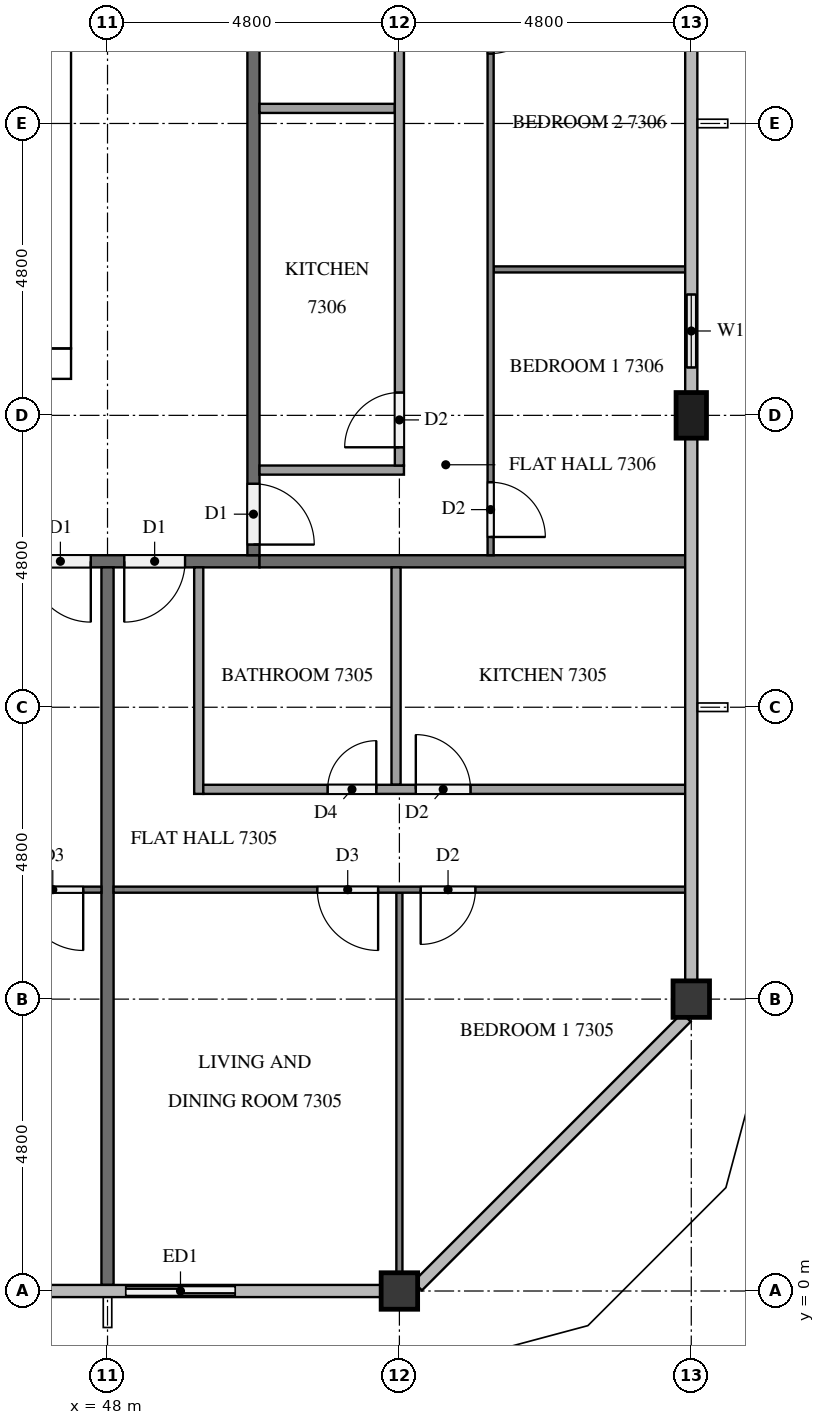
"""IFC4 building model, lengths in metres.
Left out: names, types, materials, properties, quantities, classifications, styles, units other than length and angle.
Written with IfcOpenShell. Run it as: python <this file> out.ifc"""

import sys

from ifc_helpers import new_model, si_unit, direction, frame, frame_2d, origin, origin_2d, place, context, subcontext, project, spatial, rectangle, extrude, element, fill, save


model = new_model("IFC4")
c1 = context("Model", 3, precision=1e-05, world=origin(), true_north=direction((0.0, 1.0)))
c2 = subcontext(c1, "Body", "Model", "MODEL_VIEW")
j1 = project(units=[si_unit("LENGTHUNIT", "METRE"), si_unit("PLANEANGLEUNIT", "RADIAN")], contexts=[c1])
p1 = place(None, origin())
s1 = spatial("IfcSite", under=j1, at=p1, CompositionType="ELEMENT")
p2 = place(p1, origin())
s2 = spatial("IfcBuilding", under=s1, at=p2, CompositionType="ELEMENT")
p3 = place(p2, frame((0.0, 0.0, 279.1)))
s3 = spatial("IfcBuildingStorey", under=s2, at=p3, CompositionType="ELEMENT", Elevation=279.1)
p4 = place(p3, frame((15.0, 15.25, 0.0), z_axis=(0.0, 0.0, 1.0), x_axis=(1.0, 0.0, 0.0)))
e1 = element("IfcWall", 1, at=p4, inside=s3, PredefinedType="SHEAR", context=c2, shape_type="SweptSolid", body=[
    extrude(rectangle(XDim=32.4, YDim=0.5, at=frame_2d((16.2, 0.0))), origin(), (0.0, 0.0, 1.0), 3.2),
])
p5 = place(p4, frame((15.3, 0.0, 0.0)))
e2 = element("IfcOpeningElement", 2, at=p5, cuts=e1, PredefinedType="OPENING", context=c2, shape_type="SweptSolid", body=[
    extrude(rectangle(XDim=1.8, YDim=2.1, at=frame_2d((0.9, 1.05))), frame((0.0, 0.26, 0.0), z_axis=(0.0, -1.0, 0.0), x_axis=(1.0, 0.0, 0.0)), (0.0, 0.0, 1.0), 0.52),
])
p6 = place(p3, frame((47.15, 15.5, 0.0), z_axis=(0.0, 0.0, 1.0), x_axis=(0.0, 1.0, 0.0)))
e3 = element("IfcWall", 3, at=p6, inside=s3, PredefinedType="SHEAR", context=c2, shape_type="SweptSolid", body=[
    extrude(rectangle(XDim=21.8, YDim=0.5, at=frame_2d((10.9, 0.0))), origin(), (0.0, 0.0, 1.0), 3.2),
])
p7 = place(p6, frame((10.6, 0.0, 0.0)))
e4 = element("IfcOpeningElement", 4, at=p7, cuts=e3, PredefinedType="OPENING", context=c2, shape_type="SweptSolid", body=[
    extrude(rectangle(XDim=1.2, YDim=2.1, at=frame_2d((0.6, 1.05))), frame((0.0, 0.26, 0.0), z_axis=(0.0, -1.0, 0.0), x_axis=(1.0, 0.0, 0.0)), (0.0, 0.0, 1.0), 0.52),
])
for number, where, z_axis, x_axis in (
    (5, (52.8, 0.0, 0.0), (0.0, 0.0, 1.0), (1.0, 0.0, 0.0)),
    (6, (57.6, 4.8, 0.0), (0.0, 0.0, 1.0), (1.0, 0.0, 0.0)),
):
    element("IfcColumn", number, at=place(p3, frame(where, z_axis=z_axis, x_axis=x_axis)), inside=s3, PredefinedType="COLUMN", context=c2, shape_type="SweptSolid", body=[
        extrude(rectangle(XDim=0.6, YDim=0.6, at=origin_2d()), origin(), (0.0, 0.0, 1.0), 3.2),
    ])
p8 = place(p3, frame((57.6, 14.4, 0.0), z_axis=(0.0, 0.0, 1.0), x_axis=(0.0, 1.0, 0.0)))
e7 = element("IfcColumn", 7, at=p8, inside=s3, PredefinedType="COLUMN", context=c2, shape_type="SweptSolid", body=[
    extrude(rectangle(XDim=0.75, YDim=0.5, at=origin_2d()), origin(), (0.0, 0.0, 1.0), 3.2),
])
p9 = place(p3, frame((48.0, 0.0, 0.0), z_axis=(0.0, 0.0, 1.0), x_axis=(1.0, 0.0, 0.0)))
e8 = element("IfcWall", 8, at=p9, inside=s3, PredefinedType="SOLIDWALL", context=c2, shape_type="SweptSolid", body=[
    extrude(rectangle(XDim=2.4, YDim=0.15, at=frame_2d((1.2, 0.0))), origin(), (0.0, 0.0, 1.0), 3.2),
])
p10 = place(p9, frame((0.3, 0.0, 0.0)))
e9 = element("IfcOpeningElement", 9, at=p10, cuts=e8, PredefinedType="OPENING", context=c2, shape_type="SweptSolid", body=[
    extrude(rectangle(XDim=1.8, YDim=2.4, at=frame_2d((0.9, 1.2))), frame((0.0, 0.085, 0.0), z_axis=(0.0, -1.0, 0.0), x_axis=(1.0, 0.0, 0.0)), (0.0, 0.0, 1.0), 0.17),
])
p11 = place(p3, frame((57.6, 14.775, 0.0), z_axis=(0.0, 0.0, 1.0), x_axis=(0.0, 1.0, 0.0)))
e10 = element("IfcWall", 10, at=p11, inside=s3, PredefinedType="SOLIDWALL", context=c2, shape_type="SweptSolid", body=[
    extrude(rectangle(XDim=2.025, YDim=0.15, at=frame_2d((1.013, 0.0))), origin(), (0.0, 0.0, 1.0), 3.2),
])
p12 = place(p11, frame((0.413, 0.0, 0.9)))
e11 = element("IfcOpeningElement", 11, at=p12, cuts=e10, PredefinedType="OPENING", context=c2, shape_type="SweptSolid", body=[
    extrude(rectangle(XDim=1.2, YDim=1.4, at=frame_2d((0.6, 0.7))), frame((0.0, 0.085, 0.0), z_axis=(0.0, -1.0, 0.0), x_axis=(1.0, 0.0, 0.0)), (0.0, 0.0, 1.0), 0.17),
])
p13 = place(p3, frame((50.5, 12.0, 0.0), z_axis=(0.0, 0.0, 1.0), x_axis=(-1.0, 0.0, 0.0)))
e12 = element("IfcWall", 12, at=p13, inside=s3, PredefinedType="PARTITIONING", context=c2, shape_type="SweptSolid", body=[
    extrude(rectangle(XDim=38.6, YDim=0.2, at=frame_2d((19.3, 0.0))), origin(), (0.0, 0.0, 1.0), 3.2),
])
p14 = place(p13, frame((36.375, 0.0, 0.0)))
e13 = element("IfcOpeningElement", 13, at=p14, cuts=e12, PredefinedType="OPENING", context=c2, shape_type="SweptSolid", body=[
    extrude(rectangle(XDim=1.0, YDim=2.1, at=frame_2d((0.5, 1.05))), frame((0.0, 0.11, 0.0), z_axis=(0.0, -1.0, 0.0), x_axis=(1.0, 0.0, 0.0)), (0.0, 0.0, 1.0), 0.22),
])
p15 = place(p13, frame((29.175, 0.0, 0.0)))
e14 = element("IfcOpeningElement", 14, at=p15, cuts=e12, PredefinedType="OPENING", context=c2, shape_type="SweptSolid", body=[
    extrude(rectangle(XDim=1.0, YDim=2.1, at=frame_2d((0.5, 1.05))), frame((0.0, 0.11, 0.0), z_axis=(0.0, -1.0, 0.0), x_axis=(1.0, 0.0, 0.0)), (0.0, 0.0, 1.0), 0.22),
])
p16 = place(p13, frame((27.625, 0.0, 0.0)))
e15 = element("IfcOpeningElement", 15, at=p16, cuts=e12, PredefinedType="OPENING", context=c2, shape_type="SweptSolid", body=[
    extrude(rectangle(XDim=1.0, YDim=2.1, at=frame_2d((0.5, 1.05))), frame((0.0, 0.11, 0.0), z_axis=(0.0, -1.0, 0.0), x_axis=(1.0, 0.0, 0.0)), (0.0, 0.0, 1.0), 0.22),
])
p17 = place(p13, frame((2.775, 0.0, 0.0)))
e16 = element("IfcOpeningElement", 16, at=p17, cuts=e12, PredefinedType="OPENING", context=c2, shape_type="SweptSolid", body=[
    extrude(rectangle(XDim=1.0, YDim=2.1, at=frame_2d((0.5, 1.05))), frame((0.0, 0.11, 0.0), z_axis=(0.0, -1.0, 0.0), x_axis=(1.0, 0.0, 0.0)), (0.0, 0.0, 1.0), 0.22),
])
p18 = place(p13, frame((1.225, 0.0, 0.0)))
e17 = element("IfcOpeningElement", 17, at=p18, cuts=e12, PredefinedType="OPENING", context=c2, shape_type="SweptSolid", body=[
    extrude(rectangle(XDim=1.0, YDim=2.1, at=frame_2d((0.5, 1.05))), frame((0.0, 0.11, 0.0), z_axis=(0.0, -1.0, 0.0), x_axis=(1.0, 0.0, 0.0)), (0.0, 0.0, 1.0), 0.22),
])
p19 = place(p3, frame((50.4, 40.7, 0.0), z_axis=(0.0, 0.0, 1.0), x_axis=(0.0, -1.0, 0.0)))
e18 = element("IfcWall", 18, at=p19, inside=s3, PredefinedType="PARTITIONING", context=c2, shape_type="SweptSolid", body=[
    extrude(rectangle(XDim=28.6, YDim=0.2, at=frame_2d((14.3, 0.0))), origin(), (0.0, 0.0, 1.0), 3.2),
])
p20 = place(p19, frame((27.425, 0.0, 0.0)))
e19 = element("IfcOpeningElement", 19, at=p20, cuts=e18, PredefinedType="OPENING", context=c2, shape_type="SweptSolid", body=[
    extrude(rectangle(XDim=1.0, YDim=2.1, at=frame_2d((0.5, 1.05))), frame((0.0, 0.11, 0.0), z_axis=(0.0, -1.0, 0.0), x_axis=(1.0, 0.0, 0.0)), (0.0, 0.0, 1.0), 0.22),
])
p21 = place(p19, frame((13.025, 0.0, 0.0)))
e20 = element("IfcOpeningElement", 20, at=p21, cuts=e18, PredefinedType="OPENING", context=c2, shape_type="SweptSolid", body=[
    extrude(rectangle(XDim=1.0, YDim=2.1, at=frame_2d((0.5, 1.05))), frame((0.0, 0.11, 0.0), z_axis=(0.0, -1.0, 0.0), x_axis=(1.0, 0.0, 0.0)), (0.0, 0.0, 1.0), 0.22),
])
p22 = place(p3, frame((48.0, 11.9, 0.0), z_axis=(0.0, 0.0, 1.0), x_axis=(0.0, -1.0, 0.0)))
e21 = element("IfcWall", 21, at=p22, inside=s3, PredefinedType="PARTITIONING", context=c2, shape_type="SweptSolid", body=[
    extrude(rectangle(XDim=11.8, YDim=0.2, at=frame_2d((5.9, 0.0))), origin(), (0.0, 0.0, 1.0), 3.2),
])
p23 = place(p3, frame((50.5, 12.0, 0.0), z_axis=(0.0, 0.0, 1.0), x_axis=(1.0, 0.0, 0.0)))
e22 = element("IfcWall", 22, at=p23, inside=s3, PredefinedType="PARTITIONING", context=c2, shape_type="SweptSolid", body=[
    extrude(rectangle(XDim=7.0, YDim=0.2, at=frame_2d((3.5, 0.0))), origin(), (0.0, 0.0, 1.0), 3.2),
])
p24 = place(p3, frame((47.9, 6.6, 0.0), z_axis=(0.0, 0.0, 1.0), x_axis=(-1.0, 0.0, 0.0)))
e23 = element("IfcWall", 23, at=p24, inside=s3, PredefinedType="PARTITIONING", context=c2, shape_type="SweptSolid", body=[
    extrude(rectangle(XDim=11.8, YDim=0.1, at=frame_2d((5.9, 0.0))), origin(), (0.0, 0.0, 1.0), 3.2),
])
p25 = place(p24, frame((0.3, 0.0, 0.0)))
e24 = element("IfcOpeningElement", 24, at=p25, cuts=e23, PredefinedType="OPENING", context=c2, shape_type="SweptSolid", body=[
    extrude(rectangle(XDim=1.0, YDim=2.1, at=frame_2d((0.5, 1.05))), frame((0.0, 0.06, 0.0), z_axis=(0.0, -1.0, 0.0), x_axis=(1.0, 0.0, 0.0)), (0.0, 0.0, 1.0), 0.12),
])
p26 = place(p24, frame((10.6, 0.0, 0.0)))
e25 = element("IfcOpeningElement", 25, at=p26, cuts=e23, PredefinedType="OPENING", context=c2, shape_type="SweptSolid", body=[
    extrude(rectangle(XDim=0.9, YDim=2.1, at=frame_2d((0.45, 1.05))), frame((0.0, 0.06, 0.0), z_axis=(0.0, -1.0, 0.0), x_axis=(1.0, 0.0, 0.0)), (0.0, 0.0, 1.0), 0.12),
])
p27 = place(p3, frame((52.8, 6.55, 0.0), z_axis=(0.0, 0.0, 1.0), x_axis=(0.0, -1.0, 0.0)))
e26 = element("IfcWall", 26, at=p27, inside=s3, PredefinedType="PARTITIONING", context=c2, shape_type="SweptSolid", body=[
    extrude(rectangle(XDim=6.25, YDim=0.1, at=frame_2d((3.125, 0.0))), origin(), (0.0, 0.0, 1.0), 3.2),
])
p28 = place(p3, frame((57.5, 6.6, 0.0), z_axis=(0.0, 0.0, 1.0), x_axis=(-1.0, 0.0, 0.0)))
e27 = element("IfcWall", 27, at=p28, inside=s3, PredefinedType="PARTITIONING", context=c2, shape_type="SweptSolid", body=[
    extrude(rectangle(XDim=9.4, YDim=0.1, at=frame_2d((4.7, 0.0))), origin(), (0.0, 0.0, 1.0), 3.2),
])
p29 = place(p28, frame((5.05, 0.0, 0.0)))
e28 = element("IfcOpeningElement", 28, at=p29, cuts=e27, PredefinedType="OPENING", context=c2, shape_type="SweptSolid", body=[
    extrude(rectangle(XDim=1.0, YDim=2.1, at=frame_2d((0.5, 1.05))), frame((0.0, 0.06, 0.0), z_axis=(0.0, -1.0, 0.0), x_axis=(1.0, 0.0, 0.0)), (0.0, 0.0, 1.0), 0.12),
])
p30 = place(p28, frame((3.45, 0.0, 0.0)))
e29 = element("IfcOpeningElement", 29, at=p30, cuts=e27, PredefinedType="OPENING", context=c2, shape_type="SweptSolid", body=[
    extrude(rectangle(XDim=0.9, YDim=2.1, at=frame_2d((0.45, 1.05))), frame((0.0, 0.06, 0.0), z_axis=(0.0, -1.0, 0.0), x_axis=(1.0, 0.0, 0.0)), (0.0, 0.0, 1.0), 0.12),
])
p31 = place(p3, frame((52.745, 11.9, 0.0), z_axis=(0.0, 0.0, 1.0), x_axis=(0.0, -1.0, 0.0)))
e30 = element("IfcWall", 30, at=p31, inside=s3, PredefinedType="PARTITIONING", context=c2, shape_type="SweptSolid", body=[
    extrude(rectangle(XDim=3.575, YDim=0.15, at=frame_2d((1.788, 0.0))), origin(), (0.0, 0.0, 1.0), 3.2),
])
p32 = place(p3, frame((49.5, 11.9, 0.0), z_axis=(0.0, 0.0, 1.0), x_axis=(0.0, -1.0, 0.0)))
e31 = element("IfcWall", 31, at=p32, inside=s3, PredefinedType="PARTITIONING", context=c2, shape_type="SweptSolid", body=[
    extrude(rectangle(XDim=3.725, YDim=0.15, at=frame_2d((1.862, 0.0))), origin(), (0.0, 0.0, 1.0), 3.2),
])
p33 = place(p3, frame((49.575, 8.25, 0.0), z_axis=(0.0, 0.0, 1.0), x_axis=(1.0, 0.0, 0.0)))
e32 = element("IfcWall", 32, at=p33, inside=s3, PredefinedType="PARTITIONING", context=c2, shape_type="SweptSolid", body=[
    extrude(rectangle(XDim=7.925, YDim=0.15, at=frame_2d((3.962, 0.0))), origin(), (0.0, 0.0, 1.0), 3.2),
])
p34 = place(p33, frame((2.045, 0.0, 0.0)))
e33 = element("IfcOpeningElement", 33, at=p34, cuts=e32, PredefinedType="OPENING", context=c2, shape_type="SweptSolid", body=[
    extrude(rectangle(XDim=0.8, YDim=2.1, at=frame_2d((0.4, 1.05))), frame((0.0, 0.085, 0.0), z_axis=(0.0, -1.0, 0.0), x_axis=(1.0, 0.0, 0.0)), (0.0, 0.0, 1.0), 0.17),
])
p35 = place(p33, frame((3.495, 0.0, 0.0)))
e34 = element("IfcOpeningElement", 34, at=p35, cuts=e32, PredefinedType="OPENING", context=c2, shape_type="SweptSolid", body=[
    extrude(rectangle(XDim=0.9, YDim=2.1, at=frame_2d((0.45, 1.05))), frame((0.0, 0.085, 0.0), z_axis=(0.0, -1.0, 0.0), x_axis=(1.0, 0.0, 0.0)), (0.0, 0.0, 1.0), 0.17),
])
p36 = place(p3, frame((54.35, 16.8, 0.0), z_axis=(0.0, 0.0, 1.0), x_axis=(1.0, 0.0, 0.0)))
e35 = element("IfcWall", 35, at=p36, inside=s3, PredefinedType="PARTITIONING", context=c2, shape_type="SweptSolid", body=[
    extrude(rectangle(XDim=3.15, YDim=0.1, at=frame_2d((1.575, 0.0))), origin(), (0.0, 0.0, 1.0), 3.2),
])
p37 = place(p3, frame((54.3, 26.3, 0.0), z_axis=(0.0, 0.0, 1.0), x_axis=(0.0, -1.0, 0.0)))
e36 = element("IfcWall", 36, at=p37, inside=s3, PredefinedType="PARTITIONING", context=c2, shape_type="SweptSolid", body=[
    extrude(rectangle(XDim=14.2, YDim=0.1, at=frame_2d((7.1, 0.0))), origin(), (0.0, 0.0, 1.0), 3.2),
])
p38 = place(p37, frame((13.0, 0.0, 0.0)))
e37 = element("IfcOpeningElement", 37, at=p38, cuts=e36, PredefinedType="OPENING", context=c2, shape_type="SweptSolid", body=[
    extrude(rectangle(XDim=0.9, YDim=2.1, at=frame_2d((0.45, 1.05))), frame((0.0, 0.06, 0.0), z_axis=(0.0, -1.0, 0.0), x_axis=(1.0, 0.0, 0.0)), (0.0, 0.0, 1.0), 0.12),
])
p39 = place(p37, frame((5.05, 0.0, 0.0)))
e38 = element("IfcOpeningElement", 38, at=p39, cuts=e36, PredefinedType="OPENING", context=c2, shape_type="SweptSolid", body=[
    extrude(rectangle(XDim=0.9, YDim=2.1, at=frame_2d((0.45, 1.05))), frame((0.0, 0.06, 0.0), z_axis=(0.0, -1.0, 0.0), x_axis=(1.0, 0.0, 0.0)), (0.0, 0.0, 1.0), 0.12),
])
p40 = place(p37, frame((3.35, 0.0, 0.0)))
e39 = element("IfcOpeningElement", 39, at=p40, cuts=e36, PredefinedType="OPENING", context=c2, shape_type="SweptSolid", body=[
    extrude(rectangle(XDim=1.0, YDim=2.1, at=frame_2d((0.5, 1.05))), frame((0.0, 0.06, 0.0), z_axis=(0.0, -1.0, 0.0), x_axis=(1.0, 0.0, 0.0)), (0.0, 0.0, 1.0), 0.12),
])
p41 = place(p3, frame((50.5, 19.448, 0.0), z_axis=(0.0, 0.0, 1.0), x_axis=(1.0, 0.0, 0.0)))
e40 = element("IfcWall", 40, at=p41, inside=s3, PredefinedType="PARTITIONING", context=c2, shape_type="SweptSolid", body=[
    extrude(rectangle(XDim=2.225, YDim=0.15, at=frame_2d((1.113, 0.0))), origin(), (0.0, 0.0, 1.0), 3.2),
])
p42 = place(p3, frame((50.5, 13.5, 0.0), z_axis=(0.0, 0.0, 1.0), x_axis=(1.0, 0.0, 0.0)))
e41 = element("IfcWall", 41, at=p42, inside=s3, PredefinedType="PARTITIONING", context=c2, shape_type="SweptSolid", body=[
    extrude(rectangle(XDim=2.375, YDim=0.15, at=frame_2d((1.188, 0.0))), origin(), (0.0, 0.0, 1.0), 3.2),
])
p43 = place(p3, frame((52.8, 13.575, 0.0), z_axis=(0.0, 0.0, 1.0), x_axis=(0.0, 1.0, 0.0)))
e42 = element("IfcWall", 42, at=p43, inside=s3, PredefinedType="PARTITIONING", context=c2, shape_type="SweptSolid", body=[
    extrude(rectangle(XDim=12.725, YDim=0.15, at=frame_2d((6.363, 0.0))), origin(), (0.0, 0.0, 1.0), 3.2),
])
p44 = place(p43, frame((0.3, 0.0, 0.0)))
e43 = element("IfcOpeningElement", 43, at=p44, cuts=e42, PredefinedType="OPENING", context=c2, shape_type="SweptSolid", body=[
    extrude(rectangle(XDim=0.9, YDim=2.1, at=frame_2d((0.45, 1.05))), frame((0.0, 0.085, 0.0), z_axis=(0.0, -1.0, 0.0), x_axis=(1.0, 0.0, 0.0)), (0.0, 0.0, 1.0), 0.17),
])
p45 = place(p43, frame((8.563, 0.0, 0.0)))
e44 = element("IfcOpeningElement", 44, at=p45, cuts=e42, PredefinedType="OPENING", context=c2, shape_type="SweptSolid", body=[
    extrude(rectangle(XDim=0.9, YDim=2.1, at=frame_2d((0.45, 1.05))), frame((0.0, 0.085, 0.0), z_axis=(0.0, -1.0, 0.0), x_axis=(1.0, 0.0, 0.0)), (0.0, 0.0, 1.0), 0.17),
])
p46 = place(p43, frame((10.114, 0.0, 0.0)))
e45 = element("IfcOpeningElement", 45, at=p46, cuts=e42, PredefinedType="OPENING", context=c2, shape_type="SweptSolid", body=[
    extrude(rectangle(XDim=0.8, YDim=2.1, at=frame_2d((0.4, 1.05))), frame((0.0, 0.085, 0.0), z_axis=(0.0, -1.0, 0.0), x_axis=(1.0, 0.0, 0.0)), (0.0, 0.0, 1.0), 0.17),
])
p47 = place(p10, origin())
e46 = element("IfcDoor", 46, at=p47, inside=s3, OperationType="SLIDING_TO_LEFT", PredefinedType="DOOR", context=c2, shape_type="SweptSolid", body=[
    extrude(rectangle(XDim=1.8, YDim=2.4, at=frame_2d((0.9, 1.2))), frame((0.0, 0.025, 0.0), z_axis=(0.0, -1.0, 0.0), x_axis=(1.0, 0.0, 0.0)), (0.0, 0.0, 1.0), 0.05),
])
fill(e9, e46)
p48 = place(p12, origin())
e47 = element("IfcWindow", 47, at=p48, inside=s3, PartitioningType="SINGLE_PANEL", PredefinedType="WINDOW", context=c2, shape_type="SweptSolid", body=[
    extrude(rectangle(XDim=1.2, YDim=1.4, at=frame_2d((0.6, 0.7))), frame((0.0, 0.03, 0.0), z_axis=(0.0, -1.0, 0.0), x_axis=(1.0, 0.0, 0.0)), (0.0, 0.0, 1.0), 0.06),
])
fill(e11, e47)
p49 = place(p17, origin())
e48 = element("IfcDoor", 48, at=p49, inside=s3, OperationType="SINGLE_SWING_LEFT", PredefinedType="DOOR", context=c2, shape_type="SweptSolid", body=[
    extrude(rectangle(XDim=1.0, YDim=2.1, at=frame_2d((0.5, 1.05))), frame((0.0, 0.025, 0.0), z_axis=(0.0, -1.0, 0.0), x_axis=(1.0, 0.0, 0.0)), (0.0, 0.0, 1.0), 0.05),
])
fill(e16, e48)
p50 = place(p18, origin())
e49 = element("IfcDoor", 49, at=p50, inside=s3, OperationType="SINGLE_SWING_RIGHT", PredefinedType="DOOR", context=c2, shape_type="SweptSolid", body=[
    extrude(rectangle(XDim=1.0, YDim=2.1, at=frame_2d((0.5, 1.05))), frame((0.0, 0.025, 0.0), z_axis=(0.0, -1.0, 0.0), x_axis=(1.0, 0.0, 0.0)), (0.0, 0.0, 1.0), 0.05),
])
fill(e17, e49)
p51 = place(p20, origin())
e50 = element("IfcDoor", 50, at=p51, inside=s3, OperationType="SINGLE_SWING_RIGHT", PredefinedType="DOOR", context=c2, shape_type="SweptSolid", body=[
    extrude(rectangle(XDim=1.0, YDim=2.1, at=frame_2d((0.5, 1.05))), frame((0.0, 0.025, 0.0), z_axis=(0.0, -1.0, 0.0), x_axis=(1.0, 0.0, 0.0)), (0.0, 0.0, 1.0), 0.05),
])
fill(e19, e50)
p52 = place(p25, origin())
e51 = element("IfcDoor", 51, at=p52, inside=s3, OperationType="SINGLE_SWING_LEFT", PredefinedType="DOOR", context=c2, shape_type="SweptSolid", body=[
    extrude(rectangle(XDim=1.0, YDim=2.1, at=frame_2d((0.5, 1.05))), frame((0.0, 0.025, 0.0), z_axis=(0.0, -1.0, 0.0), x_axis=(1.0, 0.0, 0.0)), (0.0, 0.0, 1.0), 0.05),
])
fill(e24, e51)
p53 = place(p29, origin())
e52 = element("IfcDoor", 52, at=p53, inside=s3, OperationType="SINGLE_SWING_LEFT", PredefinedType="DOOR", context=c2, shape_type="SweptSolid", body=[
    extrude(rectangle(XDim=1.0, YDim=2.1, at=frame_2d((0.5, 1.05))), frame((0.0, 0.025, 0.0), z_axis=(0.0, -1.0, 0.0), x_axis=(1.0, 0.0, 0.0)), (0.0, 0.0, 1.0), 0.05),
])
fill(e28, e52)
p54 = place(p30, origin())
e53 = element("IfcDoor", 53, at=p54, inside=s3, OperationType="SINGLE_SWING_RIGHT", PredefinedType="DOOR", context=c2, shape_type="SweptSolid", body=[
    extrude(rectangle(XDim=0.9, YDim=2.1, at=frame_2d((0.45, 1.05))), frame((0.0, 0.025, 0.0), z_axis=(0.0, -1.0, 0.0), x_axis=(1.0, 0.0, 0.0)), (0.0, 0.0, 1.0), 0.05),
])
fill(e29, e53)
p55 = place(p34, origin())
e54 = element("IfcDoor", 54, at=p55, inside=s3, OperationType="SINGLE_SWING_RIGHT", PredefinedType="DOOR", context=c2, shape_type="SweptSolid", body=[
    extrude(rectangle(XDim=0.8, YDim=2.1, at=frame_2d((0.4, 1.05))), frame((0.0, 0.025, 0.0), z_axis=(0.0, -1.0, 0.0), x_axis=(1.0, 0.0, 0.0)), (0.0, 0.0, 1.0), 0.05),
])
fill(e33, e54)
p56 = place(p35, origin())
e55 = element("IfcDoor", 55, at=p56, inside=s3, OperationType="SINGLE_SWING_LEFT", PredefinedType="DOOR", context=c2, shape_type="SweptSolid", body=[
    extrude(rectangle(XDim=0.9, YDim=2.1, at=frame_2d((0.45, 1.05))), frame((0.0, 0.025, 0.0), z_axis=(0.0, -1.0, 0.0), x_axis=(1.0, 0.0, 0.0)), (0.0, 0.0, 1.0), 0.05),
])
fill(e34, e55)
p57 = place(p38, origin())
e56 = element("IfcDoor", 56, at=p57, inside=s3, OperationType="SINGLE_SWING_RIGHT", PredefinedType="DOOR", context=c2, shape_type="SweptSolid", body=[
    extrude(rectangle(XDim=0.9, YDim=2.1, at=frame_2d((0.45, 1.05))), frame((0.0, 0.025, 0.0), z_axis=(0.0, -1.0, 0.0), x_axis=(1.0, 0.0, 0.0)), (0.0, 0.0, 1.0), 0.05),
])
fill(e37, e56)
p58 = place(p39, origin())
e57 = element("IfcDoor", 57, at=p58, inside=s3, OperationType="SINGLE_SWING_LEFT", PredefinedType="DOOR", context=c2, shape_type="SweptSolid", body=[
    extrude(rectangle(XDim=0.9, YDim=2.1, at=frame_2d((0.45, 1.05))), frame((0.0, 0.025, 0.0), z_axis=(0.0, -1.0, 0.0), x_axis=(1.0, 0.0, 0.0)), (0.0, 0.0, 1.0), 0.05),
])
fill(e38, e57)
p59 = place(p44, origin())
e58 = element("IfcDoor", 58, at=p59, inside=s3, OperationType="SINGLE_SWING_LEFT", PredefinedType="DOOR", context=c2, shape_type="SweptSolid", body=[
    extrude(rectangle(XDim=0.9, YDim=2.1, at=frame_2d((0.45, 1.05))), frame((0.0, 0.025, 0.0), z_axis=(0.0, -1.0, 0.0), x_axis=(1.0, 0.0, 0.0)), (0.0, 0.0, 1.0), 0.05),
])
fill(e43, e58)
save(model, sys.argv[1])
